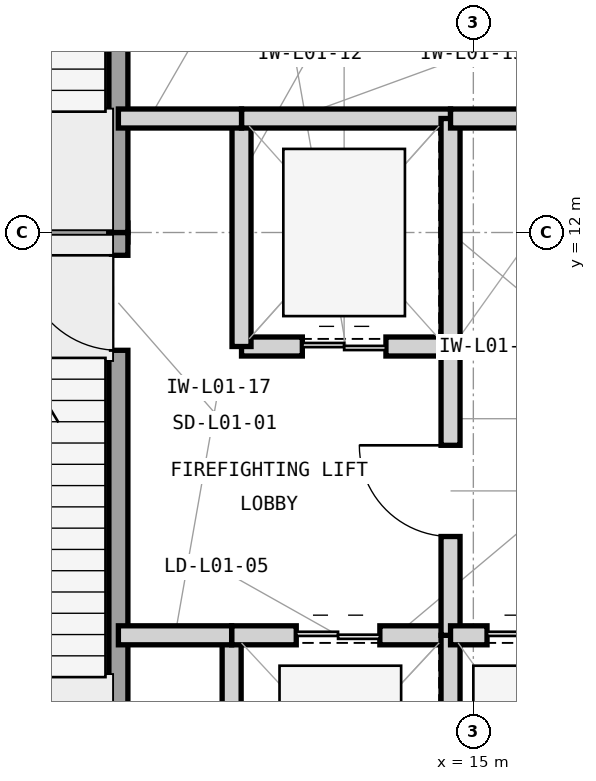
"""IFC4 building model, lengths in metres.
Left out: names, types, materials, properties, quantities, classifications, styles, units other than length and angle.
Written with IfcOpenShell. Run it as: python <this file> out.ifc"""

import sys

from ifc_helpers import new_model, si_unit, direction, frame, frame_2d, origin, place, context, subcontext, project, spatial, rectangle, extrude, element, fill, save


model = new_model("IFC4")
c1 = context("Model", 3, precision=1e-05, world=origin(), true_north=direction((0.0, 1.0)))
c2 = subcontext(c1, "Body", "Model", "MODEL_VIEW")
j1 = project(units=[si_unit("LENGTHUNIT", "METRE"), si_unit("PLANEANGLEUNIT", "RADIAN")], contexts=[c1])
p1 = place(None, origin())
s1 = spatial("IfcSite", under=j1, at=p1, CompositionType="ELEMENT")
p2 = place(p1, origin())
s2 = spatial("IfcBuilding", under=s1, at=p2, CompositionType="ELEMENT")
p3 = place(p2, frame((0.0, 0.0, 5.4)))
s3 = spatial("IfcBuildingStorey", under=s2, at=p3, CompositionType="ELEMENT", Elevation=5.4)
p4 = place(p3, frame((6.35, 12.0, 0.0), z_axis=(0.0, 0.0, 1.0), x_axis=(1.0, 0.0, 0.0)))
e1 = element("IfcWall", 1, at=p4, inside=s3, PredefinedType="SHEAR", context=c2, shape_type="SweptSolid", body=[
    extrude(rectangle(XDim=4.105, YDim=0.25, at=frame_2d((2.052, 0.0))), origin(), (0.0, 0.0, 1.0), 5.4),
])
p5 = place(p3, frame((10.33, 4.55, 0.0), z_axis=(0.0, 0.0, 1.0), x_axis=(0.0, 1.0, 0.0)))
e2 = element("IfcWall", 2, at=p5, inside=s3, PredefinedType="SHEAR", context=c2, shape_type="SweptSolid", body=[
    extrude(rectangle(XDim=7.45, YDim=0.25, at=frame_2d((3.725, 0.0))), origin(), (0.0, 0.0, 1.0), 5.4),
])
p6 = place(p5, frame((5.9, 0.0, 0.0)))
e3 = element("IfcOpeningElement", 3, at=p6, cuts=e2, PredefinedType="OPENING", context=c2, shape_type="SweptSolid", body=[
    extrude(rectangle(XDim=1.25, YDim=2.2, at=frame_2d((0.625, 1.1))), frame((0.0, 0.135, 0.0), z_axis=(0.0, -1.0, 0.0), x_axis=(1.0, 0.0, 0.0)), (0.0, 0.0, 1.0), 0.27),
])
p7 = place(p3, frame((10.33, 12.0, 0.0), z_axis=(0.0, 0.0, 1.0), x_axis=(0.0, 1.0, 0.0)))
e4 = element("IfcWall", 4, at=p7, inside=s3, PredefinedType="SHEAR", context=c2, shape_type="SweptSolid", body=[
    extrude(rectangle(XDim=7.45, YDim=0.25, at=frame_2d((3.725, 0.0))), origin(), (0.0, 0.0, 1.0), 5.4),
])
p8 = place(p7, frame((5.85, 0.0, 0.0)))
e5 = element("IfcOpeningElement", 5, at=p8, cuts=e4, PredefinedType="OPENING", context=c2, shape_type="SweptSolid", body=[
    extrude(rectangle(XDim=1.25, YDim=2.2, at=frame_2d((0.625, 1.1))), frame((0.0, 0.135, 0.0), z_axis=(0.0, -1.0, 0.0), x_axis=(1.0, 0.0, 0.0)), (0.0, 0.0, 1.0), 0.27),
])
p9 = place(p3, frame((11.82, 3.35, 0.0), z_axis=(0.0, 0.0, 1.0), x_axis=(0.0, 1.0, 0.0)))
e6 = element("IfcWall", 6, at=p9, inside=s3, PredefinedType="PARTITIONING", context=c2, shape_type="SweptSolid", body=[
    extrude(rectangle(XDim=3.35, YDim=0.25, at=frame_2d((1.675, 0.0))), origin(), (0.0, 0.0, 1.0), 5.09),
])
p10 = place(p3, frame((11.82, 6.7, 0.0), z_axis=(0.0, 0.0, 1.0), x_axis=(1.0, 0.0, 0.0)))
e7 = element("IfcWall", 7, at=p10, inside=s3, PredefinedType="PARTITIONING", context=c2, shape_type="SweptSolid", body=[
    extrude(rectangle(XDim=2.88, YDim=0.25, at=frame_2d((1.44, 0.0))), origin(), (0.0, 0.0, 1.0), 4.473),
])
p11 = place(p10, frame((0.85, 0.0, 0.0)))
e8 = element("IfcOpeningElement", 8, at=p11, cuts=e7, PredefinedType="OPENING", context=c2, shape_type="SweptSolid", body=[
    extrude(rectangle(XDim=1.1, YDim=2.25, at=frame_2d((0.55, 1.125))), frame((0.0, 0.135, 0.0), z_axis=(0.0, -1.0, 0.0), x_axis=(1.0, 0.0, 0.0)), (0.0, 0.0, 1.0), 0.27),
])
p12 = place(p3, frame((14.7, 3.35, 0.0), z_axis=(0.0, 0.0, 1.0), x_axis=(0.0, 1.0, 0.0)))
e9 = element("IfcWall", 9, at=p12, inside=s3, PredefinedType="PARTITIONING", context=c2, shape_type="SweptSolid", body=[
    extrude(rectangle(XDim=3.35, YDim=0.25, at=frame_2d((1.675, 0.0))), origin(), (0.0, 0.0, 1.0), 5.09),
])
p13 = place(p3, frame((11.95, 10.5, 0.0), z_axis=(0.0, 0.0, 1.0), x_axis=(1.0, 0.0, 0.0)))
e10 = element("IfcWall", 10, at=p13, inside=s3, PredefinedType="PARTITIONING", context=c2, shape_type="SweptSolid", body=[
    extrude(rectangle(XDim=2.75, YDim=0.25, at=frame_2d((1.375, 0.0))), origin(), (0.0, 0.0, 1.0), 4.473),
])
p14 = place(p13, frame((0.8, 0.0, 0.0)))
e11 = element("IfcOpeningElement", 11, at=p14, cuts=e10, PredefinedType="OPENING", context=c2, shape_type="SweptSolid", body=[
    extrude(rectangle(XDim=1.1, YDim=2.25, at=frame_2d((0.55, 1.125))), frame((0.0, 0.135, 0.0), z_axis=(0.0, -1.0, 0.0), x_axis=(1.0, 0.0, 0.0)), (0.0, 0.0, 1.0), 0.27),
])
p15 = place(p3, frame((11.95, 10.5, 0.0), z_axis=(0.0, 0.0, 1.0), x_axis=(0.0, 1.0, 0.0)))
e12 = element("IfcWall", 12, at=p15, inside=s3, PredefinedType="PARTITIONING", context=c2, shape_type="SweptSolid", body=[
    extrude(rectangle(XDim=3.0, YDim=0.25, at=frame_2d((1.5, 0.0))), origin(), (0.0, 0.0, 1.0), 5.09),
])
p16 = place(p3, frame((11.95, 13.5, 0.0), z_axis=(0.0, 0.0, 1.0), x_axis=(1.0, 0.0, 0.0)))
e13 = element("IfcWall", 13, at=p16, inside=s3, PredefinedType="PARTITIONING", context=c2, shape_type="SweptSolid", body=[
    extrude(rectangle(XDim=2.75, YDim=0.25, at=frame_2d((1.375, 0.0))), origin(), (0.0, 0.0, 1.0), 4.473),
])
p17 = place(p3, frame((14.7, 10.5, 0.0), z_axis=(0.0, 0.0, 1.0), x_axis=(0.0, 1.0, 0.0)))
e14 = element("IfcWall", 14, at=p17, inside=s3, PredefinedType="PARTITIONING", context=c2, shape_type="SweptSolid", body=[
    extrude(rectangle(XDim=3.0, YDim=0.25, at=frame_2d((1.5, 0.0))), origin(), (0.0, 0.0, 1.0), 5.09),
])
p18 = place(p3, frame((14.7, 6.7, 0.0), z_axis=(0.0, 0.0, 1.0), x_axis=(0.0, 1.0, 0.0)))
e15 = element("IfcWall", 15, at=p18, inside=s3, PredefinedType="PARTITIONING", context=c2, shape_type="SweptSolid", body=[
    extrude(rectangle(XDim=3.8, YDim=0.25, at=frame_2d((1.9, 0.0))), origin(), (0.0, 0.0, 1.0), 5.09),
])
p19 = place(p18, frame((1.3, 0.0, 0.0)))
e16 = element("IfcOpeningElement", 16, at=p19, cuts=e15, PredefinedType="OPENING", context=c2, shape_type="SweptSolid", body=[
    extrude(rectangle(XDim=1.2, YDim=2.2, at=frame_2d((0.6, 1.1))), frame((0.0, 0.135, 0.0), z_axis=(0.0, -1.0, 0.0), x_axis=(1.0, 0.0, 0.0)), (0.0, 0.0, 1.0), 0.27),
])
p20 = place(p3, frame((10.33, 13.5, 0.0), z_axis=(0.0, 0.0, 1.0), x_axis=(1.0, 0.0, 0.0)))
e17 = element("IfcWall", 17, at=p20, inside=s3, PredefinedType="PARTITIONING", context=c2, shape_type="SweptSolid", body=[
    extrude(rectangle(XDim=1.62, YDim=0.25, at=frame_2d((0.81, 0.0))), origin(), (0.0, 0.0, 1.0), 4.473),
])
p21 = place(p3, frame((10.33, 6.7, 0.0), z_axis=(0.0, 0.0, 1.0), x_axis=(1.0, 0.0, 0.0)))
e18 = element("IfcWall", 18, at=p21, inside=s3, PredefinedType="PARTITIONING", context=c2, shape_type="SweptSolid", body=[
    extrude(rectangle(XDim=1.49, YDim=0.25, at=frame_2d((0.745, 0.0))), origin(), (0.0, 0.0, 1.0), 4.473),
])
p22 = place(p3, frame((14.7, 6.7, 0.0), z_axis=(0.0, 0.0, 1.0), x_axis=(1.0, 0.0, 0.0)))
e19 = element("IfcWall", 19, at=p22, inside=s3, PredefinedType="PARTITIONING", context=c2, shape_type="SweptSolid", body=[
    extrude(rectangle(XDim=2.15, YDim=0.25, at=frame_2d((1.075, 0.0))), origin(), (0.0, 0.0, 1.0), 4.473),
])
p23 = place(p22, frame((0.48, 0.0, 0.0)))
e20 = element("IfcOpeningElement", 20, at=p23, cuts=e19, PredefinedType="OPENING", context=c2, shape_type="SweptSolid", body=[
    extrude(rectangle(XDim=1.15, YDim=2.25, at=frame_2d((0.575, 1.125))), frame((0.0, 0.135, 0.0), z_axis=(0.0, -1.0, 0.0), x_axis=(1.0, 0.0, 0.0)), (0.0, 0.0, 1.0), 0.27),
])
p24 = place(p3, frame((14.7, 10.5, 0.0), z_axis=(0.0, 0.0, 1.0), x_axis=(1.0, 0.0, 0.0)))
e21 = element("IfcWall", 21, at=p24, inside=s3, PredefinedType="PARTITIONING", context=c2, shape_type="SweptSolid", body=[
    extrude(rectangle(XDim=2.15, YDim=0.25, at=frame_2d((1.075, 0.0))), origin(), (0.0, 0.0, 1.0), 4.473),
])
p25 = place(p3, frame((14.7, 13.5, 0.0), z_axis=(0.0, 0.0, 1.0), x_axis=(1.0, 0.0, 0.0)))
e22 = element("IfcWall", 22, at=p25, inside=s3, PredefinedType="PARTITIONING", context=c2, shape_type="SweptSolid", body=[
    extrude(rectangle(XDim=8.95, YDim=0.25, at=frame_2d((4.475, 0.0))), origin(), (0.0, 0.0, 1.0), 4.473),
])
p26 = place(p6, origin())
e23 = element("IfcDoor", 23, at=p26, inside=s3, OperationType="SINGLE_SWING_RIGHT", PredefinedType="DOOR", context=c2, shape_type="SweptSolid", body=[
    extrude(rectangle(XDim=1.25, YDim=2.2, at=frame_2d((0.625, 1.1))), frame((0.0, 0.025, 0.0), z_axis=(0.0, -1.0, 0.0), x_axis=(1.0, 0.0, 0.0)), (0.0, 0.0, 1.0), 0.05),
])
fill(e3, e23)
p27 = place(p11, origin())
e24 = element("IfcDoor", 24, at=p27, inside=s3, OperationType="DOUBLE_DOOR_SLIDING", PredefinedType="DOOR", context=c2, shape_type="SweptSolid", body=[
    extrude(rectangle(XDim=1.1, YDim=2.25, at=frame_2d((0.55, 1.125))), frame((0.0, 0.025, 0.0), z_axis=(0.0, -1.0, 0.0), x_axis=(1.0, 0.0, 0.0)), (0.0, 0.0, 1.0), 0.05),
])
fill(e8, e24)
p28 = place(p14, origin())
e25 = element("IfcDoor", 25, at=p28, inside=s3, OperationType="DOUBLE_DOOR_SLIDING", PredefinedType="DOOR", context=c2, shape_type="SweptSolid", body=[
    extrude(rectangle(XDim=1.1, YDim=2.25, at=frame_2d((0.55, 1.125))), frame((0.0, 0.025, 0.0), z_axis=(0.0, -1.0, 0.0), x_axis=(1.0, 0.0, 0.0)), (0.0, 0.0, 1.0), 0.05),
])
fill(e11, e25)
p29 = place(p19, origin())
e26 = element("IfcDoor", 26, at=p29, inside=s3, OperationType="SINGLE_SWING_RIGHT", PredefinedType="DOOR", context=c2, shape_type="SweptSolid", body=[
    extrude(rectangle(XDim=1.2, YDim=2.2, at=frame_2d((0.6, 1.1))), frame((0.0, 0.025, 0.0), z_axis=(0.0, -1.0, 0.0), x_axis=(1.0, 0.0, 0.0)), (0.0, 0.0, 1.0), 0.05),
])
fill(e16, e26)
p30 = place(p23, origin())
e27 = element("IfcDoor", 27, at=p30, inside=s3, OperationType="DOUBLE_DOOR_SLIDING", PredefinedType="DOOR", context=c2, shape_type="SweptSolid", body=[
    extrude(rectangle(XDim=1.15, YDim=2.25, at=frame_2d((0.575, 1.125))), frame((0.0, 0.025, 0.0), z_axis=(0.0, -1.0, 0.0), x_axis=(1.0, 0.0, 0.0)), (0.0, 0.0, 1.0), 0.05),
])
fill(e20, e27)
save(model, sys.argv[1])
